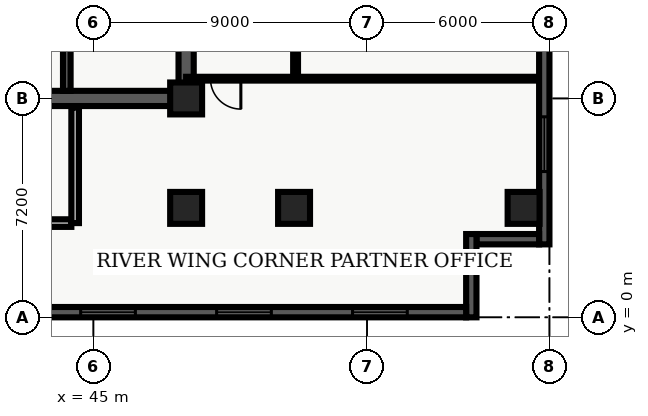
"""IFC4 building model, lengths in metres.
Left out: names, types, materials, properties, quantities, classifications, styles, units other than length and angle.
Written with IfcOpenShell. Run it as: python <this file> out.ifc"""

import sys

from ifc_helpers import new_model, entity, si_unit, converted_unit, direction, frame, origin_with_axes, origin_2d_with_axis, place, context, subcontext, project, spatial, polyline, rectangle, outline, extrude, element, fill, save


model = new_model("IFC4")
c1 = context("Model", 3, precision=1e-05, world=origin_with_axes(), true_north=direction((0.0, 1.0)))
c2 = subcontext(c1, "Body", "Model", "MODEL_VIEW")
j1 = project(units=[si_unit("LENGTHUNIT", "METRE"), converted_unit("PLANEANGLEUNIT", "DEGREE", entity("IfcPlaneAngleMeasure", 0.017), si_unit("PLANEANGLEUNIT", "RADIAN"), dimensions=[0, 0, 0, 0, 0, 0, 0])], contexts=[c1])
p1 = place(None, origin_with_axes())
s1 = spatial("IfcSite", under=j1, at=p1, CompositionType="ELEMENT")
p2 = place(p1, origin_with_axes())
s2 = spatial("IfcBuilding", under=s1, at=p2, CompositionType="ELEMENT")
p3 = place(p2, frame((0.0, 0.0, 152.4), z_axis=(0.0, 0.0, 1.0), x_axis=(1.0, 0.0, 0.0)))
s3 = spatial("IfcBuildingStorey", under=s2, at=p3, CompositionType="ELEMENT", Elevation=152.4)
p4 = place(p3, frame((40.2, 7.2, 0.0), z_axis=(0.0, 0.0, 1.0), x_axis=(1.0, 0.0, 0.0)))
e1 = element("IfcWall", 1, at=p4, inside=s3, PredefinedType="SHEAR", context=c2, shape_type="SweptSolid", body=[
    extrude(outline(polyline([(0.0, -0.25), (7.85, -0.25), (7.85, 0.25), (0.0, 0.25), (0.0, -0.25)])), origin_with_axes(), (0.0, 0.0, 1.0), 3.66),
])
p5 = place(p4, frame((2.175, 0.0, 0.0), z_axis=(0.0, 0.0, 1.0), x_axis=(1.0, 0.0, 0.0)))
e2 = element("IfcOpeningElement", 2, at=p5, cuts=e1, PredefinedType="OPENING", context=c2, shape_type="SweptSolid", body=[
    extrude(rectangle(XDim=1.05, YDim=0.52, at=origin_2d_with_axis()), origin_with_axes(), (0.0, 0.0, 1.0), 2.15),
])
p6 = place(p3, frame((48.05, 7.2, 0.0), z_axis=(0.0, 0.0, 1.0), x_axis=(0.0, 1.0, 0.0)))
e3 = element("IfcWall", 3, at=p6, inside=s3, PredefinedType="SHEAR", context=c2, shape_type="SweptSolid", body=[
    extrude(outline(polyline([(0.0, -0.25), (15.6, -0.25), (15.6, 0.25), (0.0, 0.25), (0.0, -0.25)])), origin_with_axes(), (0.0, 0.0, 1.0), 3.66),
])
p7 = place(p6, frame((5.975, 0.0, 0.0), z_axis=(0.0, 0.0, 1.0), x_axis=(1.0, 0.0, 0.0)))
e4 = element("IfcOpeningElement", 4, at=p7, cuts=e3, PredefinedType="OPENING", context=c2, shape_type="SweptSolid", body=[
    extrude(rectangle(XDim=1.05, YDim=0.52, at=origin_2d_with_axis()), origin_with_axes(), (0.0, 0.0, 1.0), 2.15),
])
p8 = place(p6, frame((2.725, 0.0, 0.0), z_axis=(0.0, 0.0, 1.0), x_axis=(1.0, 0.0, 0.0)))
e5 = element("IfcOpeningElement", 5, at=p8, cuts=e3, PredefinedType="OPENING", context=c2, shape_type="SweptSolid", body=[
    extrude(rectangle(XDim=0.95, YDim=0.52, at=origin_2d_with_axis()), origin_with_axes(), (0.0, 0.0, 1.0), 2.15),
])
p9 = place(p3, frame((44.125, 7.45, 0.0), z_axis=(0.0, 0.0, 1.0), x_axis=(0.0, 1.0, 0.0)))
e6 = element("IfcWall", 6, at=p9, inside=s3, PredefinedType="SHEAR", context=c2, shape_type="SweptSolid", body=[
    extrude(outline(polyline([(0.0, -0.125), (15.1, -0.125), (15.1, 0.125), (0.0, 0.125), (0.0, -0.125)])), origin_with_axes(), (0.0, 0.0, 1.0), 3.66),
])
p10 = place(p3, frame((40.325, 3.1, 0.0), z_axis=(0.0, 0.0, 1.0), x_axis=(1.0, 0.0, 0.0)))
e7 = element("IfcWall", 7, at=p10, inside=s3, PredefinedType="SOLIDWALL", context=c2, shape_type="SweptSolid", body=[
    extrude(outline(polyline([(0.0, -0.125), (3.95, -0.125), (3.95, 0.125), (0.0, 0.125), (0.0, -0.125)])), origin_with_axes(), (0.0, 0.0, 1.0), 2.7),
])
p11 = place(p3, frame((44.4, 3.1, 0.0), z_axis=(0.0, 0.0, 1.0), x_axis=(0.0, 1.0, 0.0)))
e8 = element("IfcWall", 8, at=p11, inside=s3, PredefinedType="SOLIDWALL", context=c2, shape_type="SweptSolid", body=[
    extrude(outline(polyline([(0.0, -0.125), (3.8, -0.125), (3.8, 0.125), (0.0, 0.125), (0.0, -0.125)])), origin_with_axes(), (0.0, 0.0, 1.0), 2.7),
])
for number, where, z_axis, x_axis in (
    (9, (48.05, 3.6, 0.0), (0.0, 0.0, 1.0), (1.0, 0.0, 0.0)),
    (10, (48.05, 7.2, 0.0), (0.0, 0.0, 1.0), (1.0, 0.0, 0.0)),
    (11, (51.6, 3.6, 0.0), (0.0, 0.0, 1.0), (1.0, 0.0, 0.0)),
    (12, (59.15, 3.6, 0.0), (0.0, 0.0, 1.0), (1.0, 0.0, 0.0)),
):
    element("IfcColumn", number, at=place(p3, frame(where, z_axis=z_axis, x_axis=x_axis)), inside=s3, PredefinedType="COLUMN", context=c2, shape_type="SweptSolid", body=[
        extrude(rectangle(XDim=1.05, YDim=1.05, at=origin_2d_with_axis()), origin_with_axes(), (0.0, 0.0, 1.0), 3.9),
    ])
p12 = place(p3, frame((51.65, 7.85, 0.0), z_axis=(0.0, 0.0, 1.0), x_axis=(0.0, 1.0, 0.0)))
e13 = element("IfcWall", 13, at=p12, inside=s3, PredefinedType="PARTITIONING", context=c2, shape_type="SweptSolid", body=[
    extrude(outline(polyline([(0.0, -0.08), (18.8, -0.08), (18.8, 0.08), (0.0, 0.08), (0.0, -0.08)])), origin_with_axes(), (0.0, 0.0, 1.0), 2.7),
])
p13 = place(p12, frame((4.222, 0.0, 0.0), z_axis=(0.0, 0.0, 1.0), x_axis=(1.0, 0.0, 0.0)))
e14 = element("IfcOpeningElement", 14, at=p13, cuts=e13, PredefinedType="OPENING", context=c2, shape_type="SweptSolid", body=[
    extrude(rectangle(XDim=1.0, YDim=0.18, at=origin_2d_with_axis()), origin_with_axes(), (0.0, 0.0, 1.0), 2.15),
])
p14 = place(p12, frame((7.845, 0.0, 0.0), z_axis=(0.0, 0.0, 1.0), x_axis=(1.0, 0.0, 0.0)))
e15 = element("IfcOpeningElement", 15, at=p14, cuts=e13, PredefinedType="OPENING", context=c2, shape_type="SweptSolid", body=[
    extrude(rectangle(XDim=1.0, YDim=0.18, at=origin_2d_with_axis()), origin_with_axes(), (0.0, 0.0, 1.0), 2.15),
])
p15 = place(p12, frame((14.072, 0.0, 0.0), z_axis=(0.0, 0.0, 1.0), x_axis=(1.0, 0.0, 0.0)))
e16 = element("IfcOpeningElement", 16, at=p15, cuts=e13, PredefinedType="OPENING", context=c2, shape_type="SweptSolid", body=[
    extrude(rectangle(XDim=1.0, YDim=0.18, at=origin_2d_with_axis()), origin_with_axes(), (0.0, 0.0, 1.0), 2.15),
])
p16 = place(p3, frame((59.665, 7.85, 0.0), z_axis=(0.0, 0.0, 1.0), x_axis=(-1.0, 0.0, 0.0)))
e17 = element("IfcWall", 17, at=p16, inside=s3, PredefinedType="PARTITIONING", context=c2, shape_type="SweptSolid", body=[
    extrude(outline(polyline([(0.0, -0.062), (11.615, -0.062), (11.615, 0.062), (0.0, 0.062), (0.0, -0.062)])), origin_with_axes(), (0.0, 0.0, 1.0), 2.7),
])
p17 = place(p16, frame((10.315, 0.0, 0.0), z_axis=(0.0, 0.0, 1.0), x_axis=(1.0, 0.0, 0.0)))
e18 = element("IfcOpeningElement", 18, at=p17, cuts=e17, PredefinedType="OPENING", context=c2, shape_type="SweptSolid", body=[
    extrude(rectangle(XDim=1.0, YDim=0.145, at=origin_2d_with_axis()), origin_with_axes(), (0.0, 0.0, 1.0), 2.15),
])
p18 = place(p3, frame((59.83, 26.06, 0.0), z_axis=(0.0, 0.0, 1.0), x_axis=(0.0, -1.0, 0.0)))
e19 = element("IfcWall", 19, at=p18, inside=s3, PredefinedType="SOLIDWALL", context=c2, shape_type="SweptSolid", body=[
    extrude(outline(polyline([(0.0, -0.17), (23.66, -0.17), (23.66, 0.17), (0.0, 0.17), (0.0, -0.17)])), origin_with_axes(), (0.0, 0.0, 1.0), 3.66),
])
p19 = place(p18, frame((3.696, 0.0, 0.45), z_axis=(0.0, 0.0, 1.0), x_axis=(1.0, 0.0, 0.0)))
e20 = element("IfcOpeningElement", 20, at=p19, cuts=e19, PredefinedType="OPENING", context=c2, shape_type="SweptSolid", body=[
    extrude(rectangle(XDim=1.8, YDim=0.36, at=origin_2d_with_axis()), origin_with_axes(), (0.0, 0.0, 1.0), 2.1),
])
p20 = place(p18, frame((11.38, 0.0, 0.45), z_axis=(0.0, 0.0, 1.0), x_axis=(1.0, 0.0, 0.0)))
e21 = element("IfcOpeningElement", 21, at=p20, cuts=e19, PredefinedType="OPENING", context=c2, shape_type="SweptSolid", body=[
    extrude(rectangle(XDim=1.8, YDim=0.36, at=origin_2d_with_axis()), origin_with_axes(), (0.0, 0.0, 1.0), 2.1),
])
p21 = place(p18, frame((20.364, 0.0, 0.45), z_axis=(0.0, 0.0, 1.0), x_axis=(1.0, 0.0, 0.0)))
e22 = element("IfcOpeningElement", 22, at=p21, cuts=e19, PredefinedType="OPENING", context=c2, shape_type="SweptSolid", body=[
    extrude(rectangle(XDim=1.8, YDim=0.36, at=origin_2d_with_axis()), origin_with_axes(), (0.0, 0.0, 1.0), 2.1),
])
p22 = place(p3, frame((59.66, 2.57, 0.0), z_axis=(0.0, 0.0, 1.0), x_axis=(-1.0, 0.0, 0.0)))
e23 = element("IfcWall", 23, at=p22, inside=s3, PredefinedType="SOLIDWALL", context=c2, shape_type="SweptSolid", body=[
    extrude(outline(polyline([(0.0, -0.17), (2.06, -0.17), (2.06, 0.17), (0.0, 0.17), (0.0, -0.17)])), origin_with_axes(), (0.0, 0.0, 1.0), 3.66),
])
p23 = place(p3, frame((57.43, 2.74, 0.0), z_axis=(0.0, 0.0, 1.0), x_axis=(0.0, -1.0, 0.0)))
e24 = element("IfcWall", 24, at=p23, inside=s3, PredefinedType="SOLIDWALL", context=c2, shape_type="SweptSolid", body=[
    extrude(outline(polyline([(0.0, -0.17), (2.74, -0.17), (2.74, 0.17), (0.0, 0.17), (0.0, -0.17)])), origin_with_axes(), (0.0, 0.0, 1.0), 3.66),
])
p24 = place(p3, frame((57.26, 0.17, 0.0), z_axis=(0.0, 0.0, 1.0), x_axis=(-1.0, 0.0, 0.0)))
e25 = element("IfcWall", 25, at=p24, inside=s3, PredefinedType="SOLIDWALL", context=c2, shape_type="SweptSolid", body=[
    extrude(outline(polyline([(0.0, -0.17), (54.86, -0.17), (54.86, 0.17), (0.0, 0.17), (0.0, -0.17)])), origin_with_axes(), (0.0, 0.0, 1.0), 3.66),
])
p25 = place(p24, frame((2.836, 0.0, 0.45), z_axis=(0.0, 0.0, 1.0), x_axis=(1.0, 0.0, 0.0)))
e26 = element("IfcOpeningElement", 26, at=p25, cuts=e25, PredefinedType="OPENING", context=c2, shape_type="SweptSolid", body=[
    extrude(rectangle(XDim=1.8, YDim=0.36, at=origin_2d_with_axis()), origin_with_axes(), (0.0, 0.0, 1.0), 2.1),
])
p26 = place(p24, frame((7.307, 0.0, 0.45), z_axis=(0.0, 0.0, 1.0), x_axis=(1.0, 0.0, 0.0)))
e27 = element("IfcOpeningElement", 27, at=p26, cuts=e25, PredefinedType="OPENING", context=c2, shape_type="SweptSolid", body=[
    extrude(rectangle(XDim=1.8, YDim=0.36, at=origin_2d_with_axis()), origin_with_axes(), (0.0, 0.0, 1.0), 2.1),
])
p27 = place(p24, frame((11.779, 0.0, 0.45), z_axis=(0.0, 0.0, 1.0), x_axis=(1.0, 0.0, 0.0)))
e28 = element("IfcOpeningElement", 28, at=p27, cuts=e25, PredefinedType="OPENING", context=c2, shape_type="SweptSolid", body=[
    extrude(rectangle(XDim=1.8, YDim=0.36, at=origin_2d_with_axis()), origin_with_axes(), (0.0, 0.0, 1.0), 2.1),
])
p28 = place(p24, frame((16.251, 0.0, 0.45), z_axis=(0.0, 0.0, 1.0), x_axis=(1.0, 0.0, 0.0)))
e29 = element("IfcOpeningElement", 29, at=p28, cuts=e25, PredefinedType="OPENING", context=c2, shape_type="SweptSolid", body=[
    extrude(rectangle(XDim=1.8, YDim=0.36, at=origin_2d_with_axis()), origin_with_axes(), (0.0, 0.0, 1.0), 2.1),
])
p29 = place(p24, frame((20.723, 0.0, 0.45), z_axis=(0.0, 0.0, 1.0), x_axis=(1.0, 0.0, 0.0)))
e30 = element("IfcOpeningElement", 30, at=p29, cuts=e25, PredefinedType="OPENING", context=c2, shape_type="SweptSolid", body=[
    extrude(rectangle(XDim=1.8, YDim=0.36, at=origin_2d_with_axis()), origin_with_axes(), (0.0, 0.0, 1.0), 2.1),
])
p30 = place(p24, frame((25.194, 0.0, 0.45), z_axis=(0.0, 0.0, 1.0), x_axis=(1.0, 0.0, 0.0)))
e31 = element("IfcOpeningElement", 31, at=p30, cuts=e25, PredefinedType="OPENING", context=c2, shape_type="SweptSolid", body=[
    extrude(rectangle(XDim=1.8, YDim=0.36, at=origin_2d_with_axis()), origin_with_axes(), (0.0, 0.0, 1.0), 2.1),
])
p31 = place(p24, frame((29.666, 0.0, 0.45), z_axis=(0.0, 0.0, 1.0), x_axis=(1.0, 0.0, 0.0)))
e32 = element("IfcOpeningElement", 32, at=p31, cuts=e25, PredefinedType="OPENING", context=c2, shape_type="SweptSolid", body=[
    extrude(rectangle(XDim=1.8, YDim=0.36, at=origin_2d_with_axis()), origin_with_axes(), (0.0, 0.0, 1.0), 2.1),
])
p32 = place(p24, frame((34.138, 0.0, 0.45), z_axis=(0.0, 0.0, 1.0), x_axis=(1.0, 0.0, 0.0)))
e33 = element("IfcOpeningElement", 33, at=p32, cuts=e25, PredefinedType="OPENING", context=c2, shape_type="SweptSolid", body=[
    extrude(rectangle(XDim=1.8, YDim=0.36, at=origin_2d_with_axis()), origin_with_axes(), (0.0, 0.0, 1.0), 2.1),
])
p33 = place(p24, frame((38.609, 0.0, 0.45), z_axis=(0.0, 0.0, 1.0), x_axis=(1.0, 0.0, 0.0)))
e34 = element("IfcOpeningElement", 34, at=p33, cuts=e25, PredefinedType="OPENING", context=c2, shape_type="SweptSolid", body=[
    extrude(rectangle(XDim=1.8, YDim=0.36, at=origin_2d_with_axis()), origin_with_axes(), (0.0, 0.0, 1.0), 2.1),
])
p34 = place(p24, frame((43.081, 0.0, 0.45), z_axis=(0.0, 0.0, 1.0), x_axis=(1.0, 0.0, 0.0)))
e35 = element("IfcOpeningElement", 35, at=p34, cuts=e25, PredefinedType="OPENING", context=c2, shape_type="SweptSolid", body=[
    extrude(rectangle(XDim=1.8, YDim=0.36, at=origin_2d_with_axis()), origin_with_axes(), (0.0, 0.0, 1.0), 2.1),
])
p35 = place(p24, frame((48.003, 0.0, 0.45), z_axis=(0.0, 0.0, 1.0), x_axis=(1.0, 0.0, 0.0)))
e36 = element("IfcOpeningElement", 36, at=p35, cuts=e25, PredefinedType="OPENING", context=c2, shape_type="SweptSolid", body=[
    extrude(rectangle(XDim=1.8, YDim=0.36, at=origin_2d_with_axis()), origin_with_axes(), (0.0, 0.0, 1.0), 2.1),
])
p36 = place(p24, frame((52.024, 0.0, 0.45), z_axis=(0.0, 0.0, 1.0), x_axis=(1.0, 0.0, 0.0)))
e37 = element("IfcOpeningElement", 37, at=p36, cuts=e25, PredefinedType="OPENING", context=c2, shape_type="SweptSolid", body=[
    extrude(rectangle(XDim=1.8, YDim=0.36, at=origin_2d_with_axis()), origin_with_axes(), (0.0, 0.0, 1.0), 2.1),
])
p37 = place(p16, frame((10.315, 0.0, 0.0), z_axis=(0.0, 0.0, 1.0), x_axis=(1.0, 0.0, 0.0)))
e38 = element("IfcDoor", 38, at=p37, inside=s3, OperationType="SINGLE_SWING_LEFT", PredefinedType="DOOR", context=c2, shape_type="SweptSolid", body=[
    extrude(rectangle(XDim=1.0, YDim=0.075, at=origin_2d_with_axis()), origin_with_axes(), (0.0, 0.0, 1.0), 2.15),
])
fill(e18, e38)
p38 = place(p18, frame((20.364, 0.0, 0.45), z_axis=(0.0, 0.0, 1.0), x_axis=(1.0, 0.0, 0.0)))
e39 = element("IfcWindow", 39, at=p38, inside=s3, PredefinedType="WINDOW", context=c2, shape_type="SweptSolid", body=[
    extrude(rectangle(XDim=1.8, YDim=0.09, at=origin_2d_with_axis()), origin_with_axes(), (0.0, 0.0, 1.0), 2.1),
])
fill(e22, e39)
p39 = place(p24, frame((2.836, 0.0, 0.45), z_axis=(0.0, 0.0, 1.0), x_axis=(1.0, 0.0, 0.0)))
e40 = element("IfcWindow", 40, at=p39, inside=s3, PredefinedType="WINDOW", context=c2, shape_type="SweptSolid", body=[
    extrude(rectangle(XDim=1.8, YDim=0.09, at=origin_2d_with_axis()), origin_with_axes(), (0.0, 0.0, 1.0), 2.1),
])
fill(e26, e40)
p40 = place(p24, frame((7.307, 0.0, 0.45), z_axis=(0.0, 0.0, 1.0), x_axis=(1.0, 0.0, 0.0)))
e41 = element("IfcWindow", 41, at=p40, inside=s3, PredefinedType="WINDOW", context=c2, shape_type="SweptSolid", body=[
    extrude(rectangle(XDim=1.8, YDim=0.09, at=origin_2d_with_axis()), origin_with_axes(), (0.0, 0.0, 1.0), 2.1),
])
fill(e27, e41)
p41 = place(p24, frame((11.779, 0.0, 0.45), z_axis=(0.0, 0.0, 1.0), x_axis=(1.0, 0.0, 0.0)))
e42 = element("IfcWindow", 42, at=p41, inside=s3, PredefinedType="WINDOW", context=c2, shape_type="SweptSolid", body=[
    extrude(rectangle(XDim=1.8, YDim=0.09, at=origin_2d_with_axis()), origin_with_axes(), (0.0, 0.0, 1.0), 2.1),
])
fill(e28, e42)
save(model, sys.argv[1])
